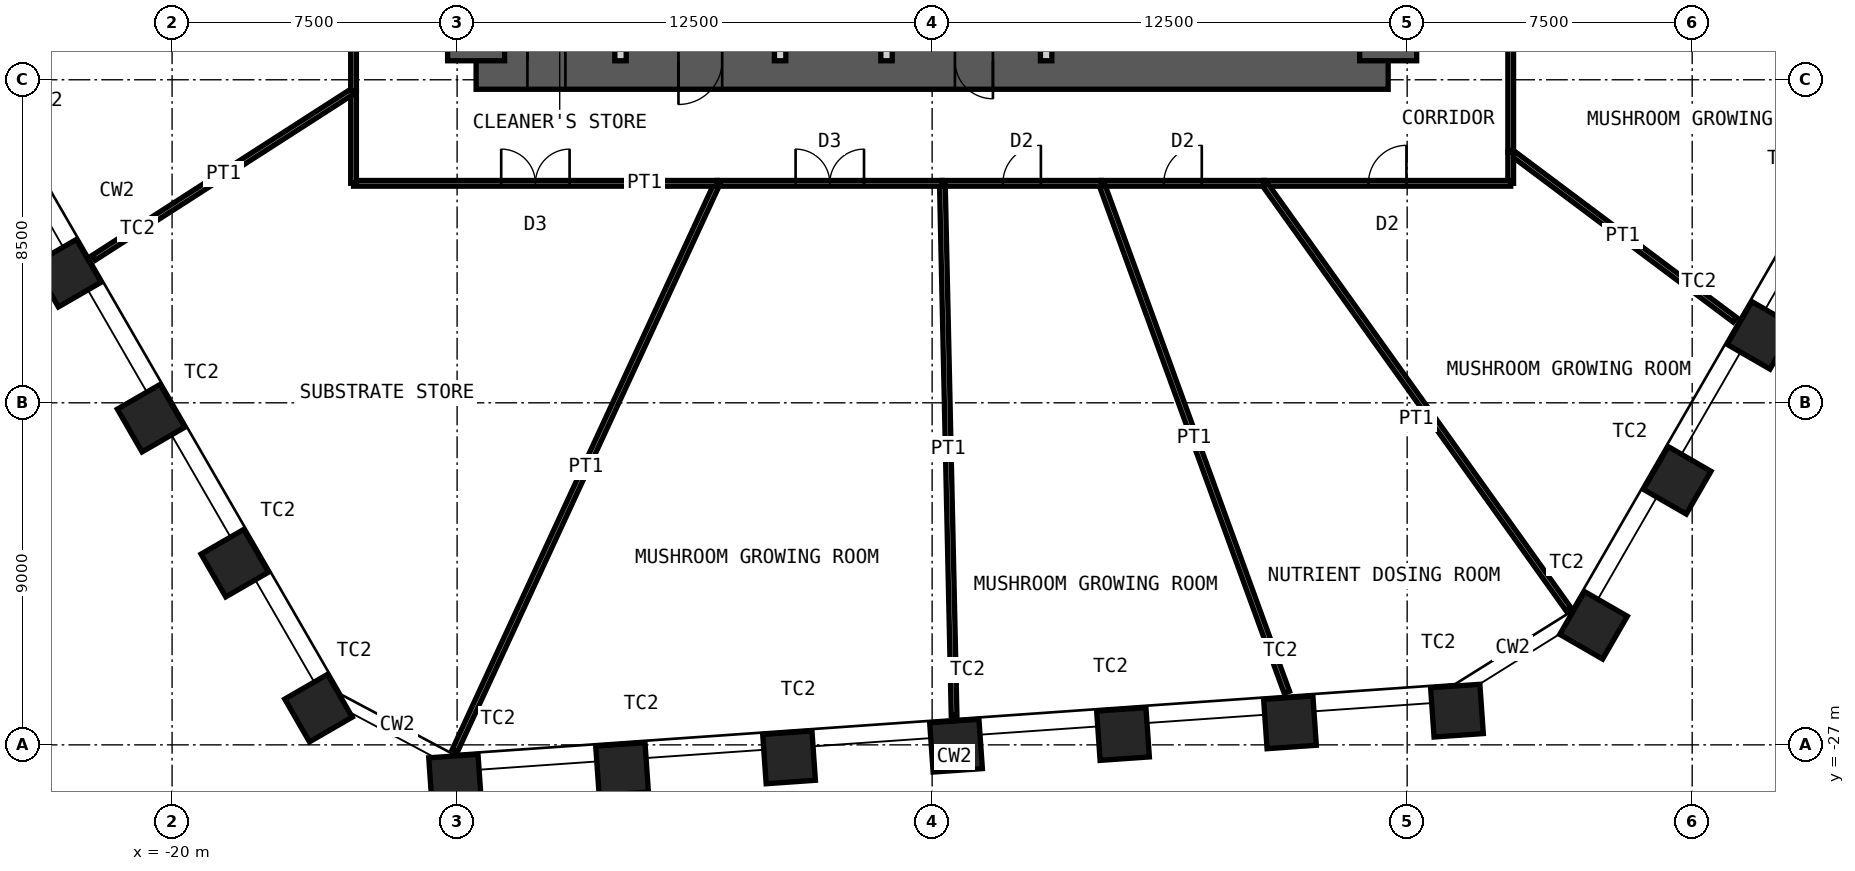
"""IFC4 building model, lengths in metres.
Left out: names, types, materials, properties, quantities, classifications, styles, units other than length and angle.
Written with IfcOpenShell. Run it as: python <this file> out.ifc"""

import sys

from ifc_helpers import new_model, si_unit, direction, frame, frame_2d, origin, origin_2d, place, context, subcontext, project, spatial, rectangle, hollow_rectangle, extrude, element, fill, save


model = new_model("IFC4")
c1 = context("Model", 3, precision=1e-05, world=origin(), true_north=direction((0.0, 1.0)))
c2 = subcontext(c1, "Body", "Model", "MODEL_VIEW")
j1 = project(units=[si_unit("LENGTHUNIT", "METRE"), si_unit("PLANEANGLEUNIT", "RADIAN")], contexts=[c1])
p1 = place(None, origin())
s1 = spatial("IfcSite", under=j1, at=p1, CompositionType="ELEMENT")
p2 = place(p1, origin())
s2 = spatial("IfcBuilding", under=s1, at=p2, CompositionType="ELEMENT")
p3 = place(p2, frame((0.0, 0.0, 67.0)))
s3 = spatial("IfcBuildingStorey", under=s2, at=p3, CompositionType="ELEMENT", Elevation=67.0)
for number, where, z_axis, x_axis in (
    (1, (21.809, -16.225, 0.0), (0.0, 0.0, 1.0), (0.5, 0.866, 0.0)),
    (2, (19.607, -20.04, 0.0), (0.0, 0.0, 1.0), (0.5, 0.866, 0.0)),
    (3, (17.405, -23.854, 0.0), (0.0, 0.0, 1.0), (0.5, 0.866, 0.0)),
    (4, (13.811, -26.1, 0.0), (0.0, 0.0, 1.0), (0.998, 0.07, 0.0)),
    (5, (9.417, -26.407, 0.0), (0.0, 0.0, 1.0), (0.998, 0.07, 0.0)),
    (6, (5.023, -26.715, 0.0), (0.0, 0.0, 1.0), (0.998, 0.07, 0.0)),
    (7, (0.629, -27.022, 0.0), (0.0, 0.0, 1.0), (0.998, 0.07, 0.0)),
    (8, (-3.765, -27.329, 0.0), (0.0, 0.0, 1.0), (0.998, 0.07, 0.0)),
    (9, (-8.159, -27.636, 0.0), (0.0, 0.0, 1.0), (0.998, 0.07, 0.0)),
    (10, (-12.553, -27.944, 0.0), (0.0, 0.0, 1.0), (0.998, 0.07, 0.0)),
    (11, (-16.147, -26.033, 0.0), (0.0, 0.0, 1.0), (0.5, -0.866, 0.0)),
    (12, (-18.349, -22.218, 0.0), (0.0, 0.0, 1.0), (0.5, -0.866, 0.0)),
    (13, (-20.552, -18.404, 0.0), (0.0, 0.0, 1.0), (0.5, -0.866, 0.0)),
    (14, (-22.754, -14.589, 0.0), (0.0, 0.0, 1.0), (0.5, -0.866, 0.0)),
):
    element("IfcColumn", number, at=place(p3, frame(where, z_axis=z_axis, x_axis=x_axis)), inside=s3, PredefinedType="COLUMN", context=c2, shape_type="SweptSolid", body=[
        extrude(hollow_rectangle(XDim=1.3, YDim=1.3, WallThickness=0.1, at=origin_2d()), origin(), (0.0, 0.0, 1.0), 5.0),
    ])
p4 = place(p3, frame((-12.0, -9.0, 0.0), z_axis=(0.0, 0.0, 1.0), x_axis=(1.0, 0.0, 0.0)))
e15 = element("IfcWall", 15, at=p4, inside=s3, PredefinedType="SHEAR", context=c2, shape_type="SweptSolid", body=[
    extrude(rectangle(XDim=24.0, YDim=1.5, at=frame_2d((12.0, 0.0))), origin(), (0.0, 0.0, 1.0), 5.0),
])
p5 = place(p4, frame((1.35, 0.0, 0.0)))
e16 = element("IfcOpeningElement", 16, at=p5, cuts=e15, PredefinedType="OPENING", context=c2, shape_type="SweptSolid", body=[
    extrude(rectangle(XDim=1.0, YDim=2.1, at=frame_2d((0.5, 1.05))), frame((0.0, 0.76, 0.0), z_axis=(0.0, -1.0, 0.0), x_axis=(1.0, 0.0, 0.0)), (0.0, 0.0, 1.0), 1.52),
])
p6 = place(p4, frame((5.325, 0.0, 0.0)))
e17 = element("IfcOpeningElement", 17, at=p6, cuts=e15, PredefinedType="OPENING", context=c2, shape_type="SweptSolid", body=[
    extrude(rectangle(XDim=1.15, YDim=2.1, at=frame_2d((0.575, 1.05))), frame((0.0, 0.76, 0.0), z_axis=(0.0, -1.0, 0.0), x_axis=(1.0, 0.0, 0.0)), (0.0, 0.0, 1.0), 1.52),
])
p7 = place(p4, frame((12.6, 0.0, 0.0)))
e18 = element("IfcOpeningElement", 18, at=p7, cuts=e15, PredefinedType="OPENING", context=c2, shape_type="SweptSolid", body=[
    extrude(rectangle(XDim=1.0, YDim=2.1, at=frame_2d((0.5, 1.05))), frame((0.0, 0.76, 0.0), z_axis=(0.0, -1.0, 0.0), x_axis=(1.0, 0.0, 0.0)), (0.0, 0.0, 1.0), 1.52),
])
p8 = place(p3, frame((12.0, -9.0, 0.0), z_axis=(0.0, 0.0, 1.0), x_axis=(0.0, 1.0, 0.0)))
e19 = element("IfcWall", 19, at=p8, inside=s3, PredefinedType="SHEAR", context=c2, shape_type="SweptSolid", body=[
    extrude(rectangle(XDim=18.0, YDim=1.5, at=frame_2d((9.0, 0.0))), origin(), (0.0, 0.0, 1.0), 5.0),
])
p9 = place(p8, frame((8.1, 0.0, 0.0)))
e20 = element("IfcOpeningElement", 20, at=p9, cuts=e19, PredefinedType="OPENING", context=c2, shape_type="SweptSolid", body=[
    extrude(rectangle(XDim=1.8, YDim=2.1, at=frame_2d((0.9, 1.05))), frame((0.0, 0.76, 0.0), z_axis=(0.0, -1.0, 0.0), x_axis=(1.0, 0.0, 0.0)), (0.0, 0.0, 1.0), 1.52),
])
p10 = place(p3, frame((-12.0, -9.0, 0.0), z_axis=(0.0, 0.0, 1.0), x_axis=(0.0, 1.0, 0.0)))
e21 = element("IfcWall", 21, at=p10, inside=s3, PredefinedType="SHEAR", context=c2, shape_type="SweptSolid", body=[
    extrude(rectangle(XDim=18.0, YDim=1.5, at=frame_2d((9.0, 0.0))), origin(), (0.0, 0.0, 1.0), 5.0),
])
p11 = place(p10, frame((8.1, 0.0, 0.0)))
e22 = element("IfcOpeningElement", 22, at=p11, cuts=e21, PredefinedType="OPENING", context=c2, shape_type="SweptSolid", body=[
    extrude(rectangle(XDim=1.8, YDim=2.1, at=frame_2d((0.9, 1.05))), frame((0.0, 0.76, 0.0), z_axis=(0.0, -1.0, 0.0), x_axis=(1.0, 0.0, 0.0)), (0.0, 0.0, 1.0), 1.52),
])
for number, where, z_axis, x_axis in (
    (23, (-8.2, -9.0, 0.0), (0.0, 0.0, 1.0), (0.0, 1.0, 0.0)),
    (24, (-4.0, -9.0, 0.0), (0.0, 0.0, 1.0), (0.0, 1.0, 0.0)),
):
    element("IfcWall", number, at=place(p3, frame(where, z_axis=z_axis, x_axis=x_axis)), inside=s3, PredefinedType="PARTITIONING", context=c2, shape_type="SweptSolid", body=[
        extrude(rectangle(XDim=3.85, YDim=0.3, at=frame_2d((1.925, 0.0))), origin(), (0.0, 0.0, 1.0), 4.78),
    ])
p12 = place(p3, frame((-1.2, -9.0, 0.0), z_axis=(0.0, 0.0, 1.0), x_axis=(0.0, 1.0, 0.0)))
e25 = element("IfcWall", 25, at=p12, inside=s3, PredefinedType="PARTITIONING", context=c2, shape_type="SweptSolid", body=[
    extrude(rectangle(XDim=3.85, YDim=0.3, at=frame_2d((1.925, 0.0))), origin(), (0.0, 0.0, 1.0), 4.78),
])
p13 = place(p12, frame((1.375, 0.0, 0.0)))
e26 = element("IfcOpeningElement", 26, at=p13, cuts=e25, PredefinedType="OPENING", context=c2, shape_type="SweptSolid", body=[
    extrude(rectangle(XDim=1.1, YDim=2.4, at=frame_2d((0.55, 1.2))), frame((0.0, 0.16, 0.0), z_axis=(0.0, -1.0, 0.0), x_axis=(1.0, 0.0, 0.0)), (0.0, 0.0, 1.0), 0.32),
])
p14 = place(p3, frame((3.0, -9.0, 0.0), z_axis=(0.0, 0.0, 1.0), x_axis=(0.0, 1.0, 0.0)))
e27 = element("IfcWall", 27, at=p14, inside=s3, PredefinedType="PARTITIONING", context=c2, shape_type="SweptSolid", body=[
    extrude(rectangle(XDim=3.85, YDim=0.3, at=frame_2d((1.925, 0.0))), origin(), (0.0, 0.0, 1.0), 4.78),
])
p15 = place(p14, frame((1.425, 0.0, 0.0)))
e28 = element("IfcOpeningElement", 28, at=p15, cuts=e27, PredefinedType="OPENING", context=c2, shape_type="SweptSolid", body=[
    extrude(rectangle(XDim=1.0, YDim=2.1, at=frame_2d((0.5, 1.05))), frame((0.0, 0.16, 0.0), z_axis=(0.0, -1.0, 0.0), x_axis=(1.0, 0.0, 0.0)), (0.0, 0.0, 1.0), 0.32),
])
p16 = place(p3, frame((15.225, -4.903, 0.0), z_axis=(0.0, 0.0, 1.0), x_axis=(0.0, -1.0, 0.0)))
e29 = element("IfcWall", 29, at=p16, inside=s3, PredefinedType="PARTITIONING", context=c2, shape_type="SweptSolid", body=[
    extrude(rectangle(XDim=6.497, YDim=0.15, at=frame_2d((3.248, 0.0))), origin(), (0.0, 0.0, 1.0), 4.8),
])
p17 = place(p16, frame((2.748, 0.0, 0.0)))
e30 = element("IfcOpeningElement", 30, at=p17, cuts=e29, PredefinedType="OPENING", context=c2, shape_type="SweptSolid", body=[
    extrude(rectangle(XDim=1.0, YDim=2.4, at=frame_2d((0.5, 1.2))), frame((0.0, 0.085, 0.0), z_axis=(0.0, -1.0, 0.0), x_axis=(1.0, 0.0, 0.0)), (0.0, 0.0, 1.0), 0.17),
])
p18 = place(p3, frame((21.123, -15.815, 0.0), z_axis=(0.0, 0.0, 1.0), x_axis=(-0.800484840692, 0.599353001012, 0.0)))
e31 = element("IfcWall", 31, at=p18, inside=s3, PredefinedType="PARTITIONING", context=c2, shape_type="SweptSolid", body=[
    extrude(rectangle(XDim=7.368, YDim=0.15, at=frame_2d((3.684, 0.0))), origin(), (0.0, 0.0, 1.0), 3.7),
])
p19 = place(p3, frame((15.225, -11.399, 0.0), z_axis=(0.0, 0.0, 1.0), x_axis=(0.0, -1.0, 0.0)))
e32 = element("IfcWall", 32, at=p19, inside=s3, PredefinedType="PARTITIONING", context=c2, shape_type="SweptSolid", body=[
    extrude(rectangle(XDim=0.826, YDim=0.15, at=frame_2d((0.413, 0.0))), origin(), (0.0, 0.0, 1.0), 4.8),
])
p20 = place(p3, frame((15.225, -12.225, 0.0), z_axis=(0.0, 0.0, 1.0), x_axis=(-1.0, 0.0, 0.0)))
e33 = element("IfcWall", 33, at=p20, inside=s3, PredefinedType="PARTITIONING", context=c2, shape_type="SweptSolid", body=[
    extrude(rectangle(XDim=6.488, YDim=0.15, at=frame_2d((3.244, 0.0))), origin(), (0.0, 0.0, 1.0), 4.8),
])
p21 = place(p20, frame((2.744, 0.0, 0.0)))
e34 = element("IfcOpeningElement", 34, at=p21, cuts=e33, PredefinedType="OPENING", context=c2, shape_type="SweptSolid", body=[
    extrude(rectangle(XDim=1.0, YDim=2.4, at=frame_2d((0.5, 1.2))), frame((0.0, 0.085, 0.0), z_axis=(0.0, -1.0, 0.0), x_axis=(1.0, 0.0, 0.0)), (0.0, 0.0, 1.0), 0.17),
])
p22 = place(p3, frame((16.74, -23.423, 0.0), z_axis=(0.0, 0.0, 1.0), x_axis=(-0.581459653783, 0.813575239927, 0.0)))
e35 = element("IfcWall", 35, at=p22, inside=s3, PredefinedType="PARTITIONING", context=c2, shape_type="SweptSolid", body=[
    extrude(rectangle(XDim=13.764, YDim=0.15, at=frame_2d((6.882, 0.0))), origin(), (0.0, 0.0, 1.0), 3.7),
])
p23 = place(p3, frame((8.737, -12.225, 0.0), z_axis=(0.0, 0.0, 1.0), x_axis=(-1.0, 0.0, 0.0)))
e36 = element("IfcWall", 36, at=p23, inside=s3, PredefinedType="PARTITIONING", context=c2, shape_type="SweptSolid", body=[
    extrude(rectangle(XDim=4.282, YDim=0.15, at=frame_2d((2.141, 0.0))), origin(), (0.0, 0.0, 1.0), 4.8),
])
p24 = place(p23, frame((1.641, 0.0, 0.0)))
e37 = element("IfcOpeningElement", 37, at=p24, cuts=e36, PredefinedType="OPENING", context=c2, shape_type="SweptSolid", body=[
    extrude(rectangle(XDim=1.0, YDim=2.4, at=frame_2d((0.5, 1.2))), frame((0.0, 0.085, 0.0), z_axis=(0.0, -1.0, 0.0), x_axis=(1.0, 0.0, 0.0)), (0.0, 0.0, 1.0), 0.17),
])
p25 = place(p3, frame((9.333, -25.615, 0.0), z_axis=(0.0, 0.0, 1.0), x_axis=(-0.342348208267, 0.939573150051, 0.0)))
e38 = element("IfcWall", 38, at=p25, inside=s3, PredefinedType="PARTITIONING", context=c2, shape_type="SweptSolid", body=[
    extrude(rectangle(XDim=14.251, YDim=0.15, at=frame_2d((7.125, 0.0))), origin(), (0.0, 0.0, 1.0), 3.7),
])
p26 = place(p3, frame((4.455, -12.225, 0.0), z_axis=(0.0, 0.0, 1.0), x_axis=(-1.0, 0.0, 0.0)))
e39 = element("IfcWall", 39, at=p26, inside=s3, PredefinedType="PARTITIONING", context=c2, shape_type="SweptSolid", body=[
    extrude(rectangle(XDim=4.185, YDim=0.15, at=frame_2d((2.093, 0.0))), origin(), (0.0, 0.0, 1.0), 4.8),
])
p27 = place(p26, frame((1.593, 0.0, 0.0)))
e40 = element("IfcOpeningElement", 40, at=p27, cuts=e39, PredefinedType="OPENING", context=c2, shape_type="SweptSolid", body=[
    extrude(rectangle(XDim=1.0, YDim=2.4, at=frame_2d((0.5, 1.2))), frame((0.0, 0.085, 0.0), z_axis=(0.0, -1.0, 0.0), x_axis=(1.0, 0.0, 0.0)), (0.0, 0.0, 1.0), 0.17),
])
p28 = place(p3, frame((0.578, -26.224, 0.0), z_axis=(0.0, 0.0, 1.0), x_axis=(-0.022039362711, 0.999757103746, 0.0)))
e41 = element("IfcWall", 41, at=p28, inside=s3, PredefinedType="PARTITIONING", context=c2, shape_type="SweptSolid", body=[
    extrude(rectangle(XDim=14.002, YDim=0.15, at=frame_2d((7.001, 0.0))), origin(), (0.0, 0.0, 1.0), 3.7),
])
p29 = place(p3, frame((0.269, -12.225, 0.0), z_axis=(0.0, 0.0, 1.0), x_axis=(-1.0, 0.0, 0.0)))
e42 = element("IfcWall", 42, at=p29, inside=s3, PredefinedType="PARTITIONING", context=c2, shape_type="SweptSolid", body=[
    extrude(rectangle(XDim=5.924, YDim=0.15, at=frame_2d((2.962, 0.0))), origin(), (0.0, 0.0, 1.0), 4.8),
])
p30 = place(p29, frame((2.062, 0.0, 0.0)))
e43 = element("IfcOpeningElement", 43, at=p30, cuts=e42, PredefinedType="OPENING", context=c2, shape_type="SweptSolid", body=[
    extrude(rectangle(XDim=1.8, YDim=2.4, at=frame_2d((0.9, 1.2))), frame((0.0, 0.085, 0.0), z_axis=(0.0, -1.0, 0.0), x_axis=(1.0, 0.0, 0.0)), (0.0, 0.0, 1.0), 0.17),
])
p31 = place(p3, frame((-12.56, -27.155, 0.0), z_axis=(0.0, 0.0, 1.0), x_axis=(0.419797833376, 0.907617639258, 0.0)))
e44 = element("IfcWall", 44, at=p31, inside=s3, PredefinedType="PARTITIONING", context=c2, shape_type="SweptSolid", body=[
    extrude(rectangle(XDim=16.449, YDim=0.15, at=frame_2d((8.225, 0.0))), origin(), (0.0, 0.0, 1.0), 3.7),
])
p32 = place(p3, frame((-5.654, -12.225, 0.0), z_axis=(0.0, 0.0, 1.0), x_axis=(-1.0, 0.0, 0.0)))
e45 = element("IfcWall", 45, at=p32, inside=s3, PredefinedType="PARTITIONING", context=c2, shape_type="SweptSolid", body=[
    extrude(rectangle(XDim=9.571, YDim=0.15, at=frame_2d((4.785, 0.0))), origin(), (0.0, 0.0, 1.0), 4.8),
])
p33 = place(p32, frame((3.885, 0.0, 0.0)))
e46 = element("IfcOpeningElement", 46, at=p33, cuts=e45, PredefinedType="OPENING", context=c2, shape_type="SweptSolid", body=[
    extrude(rectangle(XDim=1.8, YDim=2.4, at=frame_2d((0.9, 1.2))), frame((0.0, 0.085, 0.0), z_axis=(0.0, -1.0, 0.0), x_axis=(1.0, 0.0, 0.0)), (0.0, 0.0, 1.0), 0.17),
])
p34 = place(p3, frame((-15.225, -12.225, 0.0), z_axis=(0.0, 0.0, 1.0), x_axis=(0.0, 1.0, 0.0)))
e47 = element("IfcWall", 47, at=p34, inside=s3, PredefinedType="PARTITIONING", context=c2, shape_type="SweptSolid", body=[
    extrude(rectangle(XDim=2.437, YDim=0.15, at=frame_2d((1.218, 0.0))), origin(), (0.0, 0.0, 1.0), 4.8),
])
p35 = place(p3, frame((-22.063, -14.185, 0.0), z_axis=(0.0, 0.0, 1.0), x_axis=(0.8411570088, 0.540790982309, 0.0)))
e48 = element("IfcWall", 48, at=p35, inside=s3, PredefinedType="PARTITIONING", context=c2, shape_type="SweptSolid", body=[
    extrude(rectangle(XDim=8.13, YDim=0.15, at=frame_2d((4.065, 0.0))), origin(), (0.0, 0.0, 1.0), 3.7),
])
p36 = place(p3, frame((-15.225, -9.789, 0.0), z_axis=(0.0, 0.0, 1.0), x_axis=(0.0, 1.0, 0.0)))
e49 = element("IfcWall", 49, at=p36, inside=s3, PredefinedType="PARTITIONING", context=c2, shape_type="SweptSolid", body=[
    extrude(rectangle(XDim=8.308, YDim=0.15, at=frame_2d((4.154, 0.0))), origin(), (0.0, 0.0, 1.0), 4.8),
])
p37 = place(p36, frame((3.254, 0.0, 0.0)))
e50 = element("IfcOpeningElement", 50, at=p37, cuts=e49, PredefinedType="OPENING", context=c2, shape_type="SweptSolid", body=[
    extrude(rectangle(XDim=1.8, YDim=2.4, at=frame_2d((0.9, 1.2))), frame((0.0, 0.085, 0.0), z_axis=(0.0, -1.0, 0.0), x_axis=(1.0, 0.0, 0.0)), (0.0, 0.0, 1.0), 0.17),
])
p38 = place(p5, origin())
e51 = element("IfcDoor", 51, at=p38, inside=s3, OperationType="SINGLE_SWING_RIGHT", PredefinedType="DOOR", context=c2, shape_type="SweptSolid", body=[
    extrude(rectangle(XDim=1.0, YDim=2.1, at=frame_2d((0.5, 1.05))), frame((0.0, 0.025, 0.0), z_axis=(0.0, -1.0, 0.0), x_axis=(1.0, 0.0, 0.0)), (0.0, 0.0, 1.0), 0.05),
])
fill(e16, e51)
p39 = place(p6, origin())
e52 = element("IfcDoor", 52, at=p39, inside=s3, OperationType="SINGLE_SWING_LEFT", PredefinedType="DOOR", context=c2, shape_type="SweptSolid", body=[
    extrude(rectangle(XDim=1.15, YDim=2.1, at=frame_2d((0.575, 1.05))), frame((0.0, 0.025, 0.0), z_axis=(0.0, -1.0, 0.0), x_axis=(1.0, 0.0, 0.0)), (0.0, 0.0, 1.0), 0.05),
])
fill(e17, e52)
p40 = place(p7, origin())
e53 = element("IfcDoor", 53, at=p40, inside=s3, OperationType="SINGLE_SWING_RIGHT", PredefinedType="DOOR", context=c2, shape_type="SweptSolid", body=[
    extrude(rectangle(XDim=1.0, YDim=2.1, at=frame_2d((0.5, 1.05))), frame((0.0, 0.025, 0.0), z_axis=(0.0, -1.0, 0.0), x_axis=(1.0, 0.0, 0.0)), (0.0, 0.0, 1.0), 0.05),
])
fill(e18, e53)
p41 = place(p21, origin())
e54 = element("IfcDoor", 54, at=p41, inside=s3, OperationType="SINGLE_SWING_LEFT", PredefinedType="DOOR", context=c2, shape_type="SweptSolid", body=[
    extrude(rectangle(XDim=1.0, YDim=2.4, at=frame_2d((0.5, 1.2))), frame((0.0, 0.025, 0.0), z_axis=(0.0, -1.0, 0.0), x_axis=(1.0, 0.0, 0.0)), (0.0, 0.0, 1.0), 0.05),
])
fill(e34, e54)
p42 = place(p24, origin())
e55 = element("IfcDoor", 55, at=p42, inside=s3, OperationType="SINGLE_SWING_LEFT", PredefinedType="DOOR", context=c2, shape_type="SweptSolid", body=[
    extrude(rectangle(XDim=1.0, YDim=2.4, at=frame_2d((0.5, 1.2))), frame((0.0, 0.025, 0.0), z_axis=(0.0, -1.0, 0.0), x_axis=(1.0, 0.0, 0.0)), (0.0, 0.0, 1.0), 0.05),
])
fill(e37, e55)
p43 = place(p27, origin())
e56 = element("IfcDoor", 56, at=p43, inside=s3, OperationType="SINGLE_SWING_LEFT", PredefinedType="DOOR", context=c2, shape_type="SweptSolid", body=[
    extrude(rectangle(XDim=1.0, YDim=2.4, at=frame_2d((0.5, 1.2))), frame((0.0, 0.025, 0.0), z_axis=(0.0, -1.0, 0.0), x_axis=(1.0, 0.0, 0.0)), (0.0, 0.0, 1.0), 0.05),
])
fill(e40, e56)
p44 = place(p30, origin())
e57 = element("IfcDoor", 57, at=p44, inside=s3, OperationType="DOUBLE_DOOR_DOUBLE_SWING", PredefinedType="DOOR", context=c2, shape_type="SweptSolid", body=[
    extrude(rectangle(XDim=1.8, YDim=2.4, at=frame_2d((0.9, 1.2))), frame((0.0, 0.025, 0.0), z_axis=(0.0, -1.0, 0.0), x_axis=(1.0, 0.0, 0.0)), (0.0, 0.0, 1.0), 0.05),
])
fill(e43, e57)
p45 = place(p33, origin())
e58 = element("IfcDoor", 58, at=p45, inside=s3, OperationType="DOUBLE_DOOR_DOUBLE_SWING", PredefinedType="DOOR", context=c2, shape_type="SweptSolid", body=[
    extrude(rectangle(XDim=1.8, YDim=2.4, at=frame_2d((0.9, 1.2))), frame((0.0, 0.025, 0.0), z_axis=(0.0, -1.0, 0.0), x_axis=(1.0, 0.0, 0.0)), (0.0, 0.0, 1.0), 0.05),
])
fill(e46, e58)
save(model, sys.argv[1])
